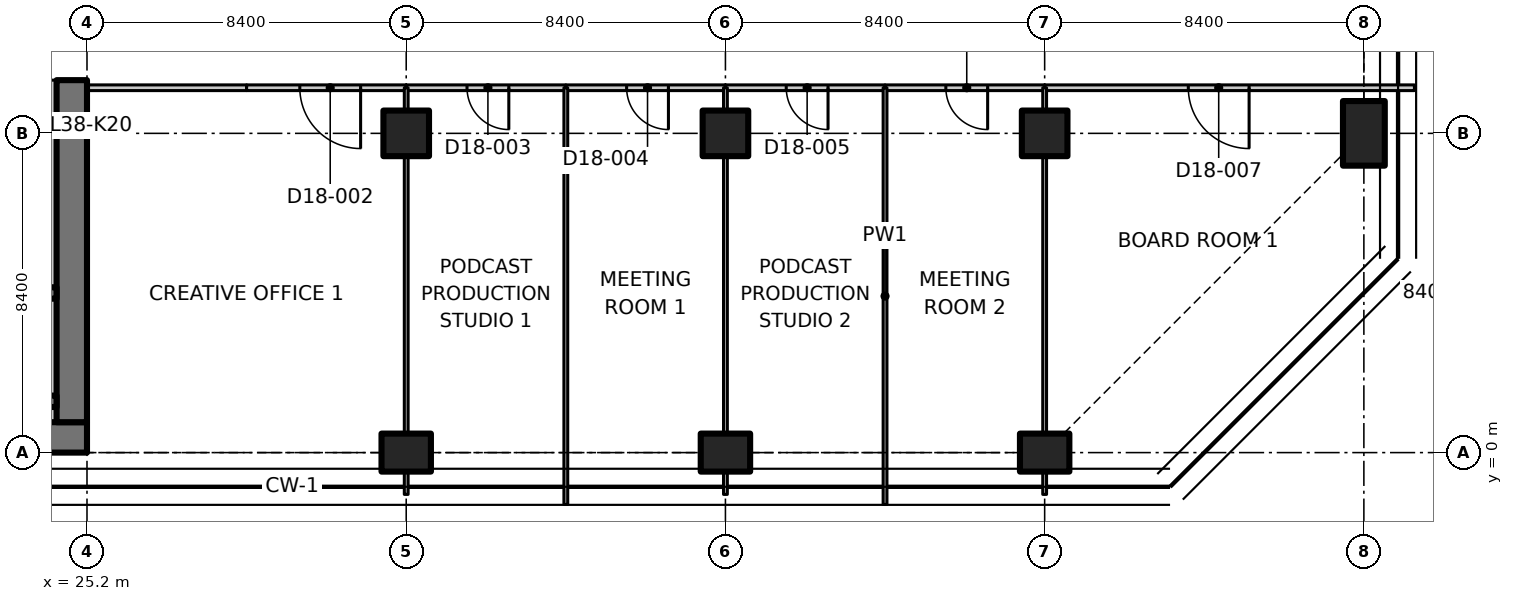
"""IFC4 building model, lengths in metres.
Left out: names, types, materials, properties, quantities, classifications, styles, units other than length and angle.
Written with IfcOpenShell. Run it as: python <this file> out.ifc"""

import sys

from ifc_helpers import new_model, si_unit, direction, frame, frame_2d, origin, origin_2d, place, context, subcontext, project, spatial, polyline, rectangle, outline, extrude, element, fill, save


model = new_model("IFC4")
c1 = context("Model", 3, precision=1e-05, world=origin(), true_north=direction((0.0, 1.0)))
c2 = subcontext(c1, "Body", "Model", "MODEL_VIEW")
j1 = project(units=[si_unit("LENGTHUNIT", "METRE"), si_unit("PLANEANGLEUNIT", "RADIAN")], contexts=[c1])
p1 = place(None, origin())
s1 = spatial("IfcSite", under=j1, at=p1, CompositionType="ELEMENT")
p2 = place(p1, origin())
s2 = spatial("IfcBuilding", under=s1, at=p2, CompositionType="ELEMENT")
p3 = place(p2, frame((0.0, 0.0, 152.9)))
s3 = spatial("IfcBuildingStorey", under=s2, at=p3, CompositionType="ELEMENT", Elevation=152.9)
p4 = place(p3, frame((33.6, 0.0, 0.0), z_axis=(0.0, 0.0, 1.0), x_axis=(0.0, 1.0, 0.0)))
e1 = element("IfcColumn", 1, at=p4, inside=s3, PredefinedType="COLUMN", context=c2, shape_type="SweptSolid", body=[
    extrude(rectangle(XDim=1.0, YDim=1.3, at=origin_2d()), origin(), (0.0, 0.0, 1.0), 3.3),
])
p5 = place(p3, frame((33.6, 8.4, 0.0), z_axis=(0.0, 0.0, 1.0), x_axis=(1.0, 0.0, 0.0)))
e2 = element("IfcColumn", 2, at=p5, inside=s3, PredefinedType="COLUMN", context=c2, shape_type="SweptSolid", body=[
    extrude(rectangle(XDim=1.2, YDim=1.2, at=origin_2d()), origin(), (0.0, 0.0, 1.0), 3.3),
])
p6 = place(p3, frame((42.0, 0.0, 0.0), z_axis=(0.0, 0.0, 1.0), x_axis=(0.0, 1.0, 0.0)))
e3 = element("IfcColumn", 3, at=p6, inside=s3, PredefinedType="COLUMN", context=c2, shape_type="SweptSolid", body=[
    extrude(rectangle(XDim=1.0, YDim=1.3, at=origin_2d()), origin(), (0.0, 0.0, 1.0), 3.3),
])
p7 = place(p3, frame((42.0, 8.4, 0.0), z_axis=(0.0, 0.0, 1.0), x_axis=(1.0, 0.0, 0.0)))
e4 = element("IfcColumn", 4, at=p7, inside=s3, PredefinedType="COLUMN", context=c2, shape_type="SweptSolid", body=[
    extrude(rectangle(XDim=1.2, YDim=1.2, at=origin_2d()), origin(), (0.0, 0.0, 1.0), 3.3),
])
p8 = place(p3, frame((50.4, 0.0, 0.0), z_axis=(0.0, 0.0, 1.0), x_axis=(0.0, 1.0, 0.0)))
e5 = element("IfcColumn", 5, at=p8, inside=s3, PredefinedType="COLUMN", context=c2, shape_type="SweptSolid", body=[
    extrude(rectangle(XDim=1.0, YDim=1.3, at=origin_2d()), origin(), (0.0, 0.0, 1.0), 3.3),
])
p9 = place(p3, frame((50.4, 8.4, 0.0), z_axis=(0.0, 0.0, 1.0), x_axis=(1.0, 0.0, 0.0)))
e6 = element("IfcColumn", 6, at=p9, inside=s3, PredefinedType="COLUMN", context=c2, shape_type="SweptSolid", body=[
    extrude(rectangle(XDim=1.2, YDim=1.2, at=origin_2d()), origin(), (0.0, 0.0, 1.0), 3.3),
])
p10 = place(p3, frame((58.8, 8.4, 0.0), z_axis=(0.0, 0.0, 1.0), x_axis=(1.0, 0.0, 0.0)))
e7 = element("IfcColumn", 7, at=p10, inside=s3, PredefinedType="COLUMN", context=c2, shape_type="SweptSolid", body=[
    extrude(rectangle(XDim=1.1, YDim=1.7, at=origin_2d()), origin(), (0.0, 0.0, 1.0), 3.3),
])
p11 = place(p3, frame((7.136, 0.4, 0.0), z_axis=(0.0, 0.0, 1.0), x_axis=(1.0, 0.0, 0.0)))
e8 = element("IfcWall", 8, at=p11, inside=s3, PredefinedType="SHEAR", context=c2, shape_type="SweptSolid", body=[
    extrude(rectangle(XDim=18.063, YDim=0.8, at=frame_2d((9.032, 0.0))), origin(), (0.0, 0.0, 1.0), 3.3),
])
p12 = place(p3, frame((24.8, 0.8, 0.0), z_axis=(0.0, 0.0, 1.0), x_axis=(0.0, 1.0, 0.0)))
e9 = element("IfcWall", 9, at=p12, inside=s3, PredefinedType="SHEAR", context=c2, shape_type="SweptSolid", body=[
    extrude(rectangle(XDim=9.0, YDim=0.8, at=frame_2d((4.5, 0.0))), origin(), (0.0, 0.0, 1.0), 3.3),
])
p13 = place(p3, frame((15.8, 1.35, 0.0), z_axis=(0.0, 0.0, 1.0), x_axis=(1.0, 0.0, 0.0)))
e10 = element("IfcWall", 10, at=p13, inside=s3, PredefinedType="SHEAR", context=c2, shape_type="SweptSolid", body=[
    extrude(rectangle(XDim=8.6, YDim=0.3, at=frame_2d((4.3, 0.0))), origin(), (0.0, 0.0, 1.0), 3.3),
])
p14 = place(p3, frame((15.8, 4.2, 0.0), z_axis=(0.0, 0.0, 1.0), x_axis=(1.0, 0.0, 0.0)))
e11 = element("IfcWall", 11, at=p14, inside=s3, PredefinedType="SHEAR", context=c2, shape_type="SweptSolid", body=[
    extrude(rectangle(XDim=8.6, YDim=0.3, at=frame_2d((4.3, 0.0))), origin(), (0.0, 0.0, 1.0), 3.3),
])
p15 = place(p14, frame((0.4, 0.0, 0.0)))
e12 = element("IfcOpeningElement", 12, at=p15, cuts=e11, PredefinedType="OPENING", context=c2, shape_type="SweptSolid", body=[
    extrude(rectangle(XDim=1.0, YDim=2.1, at=frame_2d((0.5, 1.05))), frame((0.0, 0.16, 0.0), z_axis=(0.0, -1.0, 0.0), x_axis=(1.0, 0.0, 0.0)), (0.0, 0.0, 1.0), 0.32),
])
p16 = place(p3, frame((13.35, 1.0, 0.0), z_axis=(0.0, 0.0, 1.0), x_axis=(1.0, 0.0, 0.0)))
e13 = element("IfcWall", 13, at=p16, inside=s3, PredefinedType="PARTITIONING", context=c2, shape_type="SweptSolid", body=[
    extrude(rectangle(XDim=11.05, YDim=0.4, at=frame_2d((5.525, 0.0))), origin(), (0.0, 0.0, 1.0), 3.3),
])
p17 = place(p3, frame((24.2, 1.5, 0.0), z_axis=(0.0, 0.0, 1.0), x_axis=(0.0, 1.0, 0.0)))
e14 = element("IfcWall", 14, at=p17, inside=s3, PredefinedType="PARTITIONING", context=c2, shape_type="SweptSolid", body=[
    extrude(rectangle(XDim=2.55, YDim=0.4, at=frame_2d((1.275, 0.0))), origin(), (0.0, 0.0, 1.0), 3.3),
])
p18 = place(p3, frame((24.2, 4.35, 0.0), z_axis=(0.0, 0.0, 1.0), x_axis=(0.0, 1.0, 0.0)))
e15 = element("IfcWall", 15, at=p18, inside=s3, PredefinedType="PARTITIONING", context=c2, shape_type="SweptSolid", body=[
    extrude(rectangle(XDim=5.45, YDim=0.4, at=frame_2d((2.725, 0.0))), origin(), (0.0, 0.0, 1.0), 3.3),
])
p19 = place(p3, frame((29.4, 9.6, 0.0), z_axis=(0.0, 0.0, 1.0), x_axis=(-1.0, 0.0, 0.0)))
e16 = element("IfcWall", 16, at=p19, inside=s3, PredefinedType="PARTITIONING", context=c2, shape_type="SweptSolid", body=[
    extrude(rectangle(XDim=4.2, YDim=0.15, at=frame_2d((2.1, 0.0))), origin(), (0.0, 0.0, 1.0), 3.28),
])
p20 = place(p3, frame((33.6, 9.6, 0.0), z_axis=(0.0, 0.0, 1.0), x_axis=(-1.0, 0.0, 0.0)))
e17 = element("IfcWall", 17, at=p20, inside=s3, PredefinedType="PARTITIONING", context=c2, shape_type="SweptSolid", body=[
    extrude(rectangle(XDim=4.2, YDim=0.15, at=frame_2d((2.1, 0.0))), origin(), (0.0, 0.0, 1.0), 3.28),
])
p21 = place(p20, frame((1.2, 0.0, 0.0)))
e18 = element("IfcOpeningElement", 18, at=p21, cuts=e17, PredefinedType="OPENING", context=c2, shape_type="SweptSolid", body=[
    extrude(rectangle(XDim=1.6, YDim=2.1, at=frame_2d((0.8, 1.05))), frame((0.0, 0.085, 0.0), z_axis=(0.0, -1.0, 0.0), x_axis=(1.0, 0.0, 0.0)), (0.0, 0.0, 1.0), 0.17),
])
p22 = place(p3, frame((37.8, 9.6, 0.0), z_axis=(0.0, 0.0, 1.0), x_axis=(-1.0, 0.0, 0.0)))
e19 = element("IfcWall", 19, at=p22, inside=s3, PredefinedType="PARTITIONING", context=c2, shape_type="SweptSolid", body=[
    extrude(rectangle(XDim=4.2, YDim=0.15, at=frame_2d((2.1, 0.0))), origin(), (0.0, 0.0, 1.0), 3.28),
])
p23 = place(p22, frame((1.5, 0.0, 0.0)))
e20 = element("IfcOpeningElement", 20, at=p23, cuts=e19, PredefinedType="OPENING", context=c2, shape_type="SweptSolid", body=[
    extrude(rectangle(XDim=1.1, YDim=2.1, at=frame_2d((0.55, 1.05))), frame((0.0, 0.085, 0.0), z_axis=(0.0, -1.0, 0.0), x_axis=(1.0, 0.0, 0.0)), (0.0, 0.0, 1.0), 0.17),
])
p24 = place(p3, frame((42.0, 9.6, 0.0), z_axis=(0.0, 0.0, 1.0), x_axis=(-1.0, 0.0, 0.0)))
e21 = element("IfcWall", 21, at=p24, inside=s3, PredefinedType="PARTITIONING", context=c2, shape_type="SweptSolid", body=[
    extrude(rectangle(XDim=4.2, YDim=0.15, at=frame_2d((2.1, 0.0))), origin(), (0.0, 0.0, 1.0), 3.28),
])
p25 = place(p24, frame((1.5, 0.0, 0.0)))
e22 = element("IfcOpeningElement", 22, at=p25, cuts=e21, PredefinedType="OPENING", context=c2, shape_type="SweptSolid", body=[
    extrude(rectangle(XDim=1.1, YDim=2.1, at=frame_2d((0.55, 1.05))), frame((0.0, 0.085, 0.0), z_axis=(0.0, -1.0, 0.0), x_axis=(1.0, 0.0, 0.0)), (0.0, 0.0, 1.0), 0.17),
])
p26 = place(p3, frame((46.2, 9.6, 0.0), z_axis=(0.0, 0.0, 1.0), x_axis=(-1.0, 0.0, 0.0)))
e23 = element("IfcWall", 23, at=p26, inside=s3, PredefinedType="PARTITIONING", context=c2, shape_type="SweptSolid", body=[
    extrude(rectangle(XDim=4.2, YDim=0.15, at=frame_2d((2.1, 0.0))), origin(), (0.0, 0.0, 1.0), 3.28),
])
p27 = place(p26, frame((1.5, 0.0, 0.0)))
e24 = element("IfcOpeningElement", 24, at=p27, cuts=e23, PredefinedType="OPENING", context=c2, shape_type="SweptSolid", body=[
    extrude(rectangle(XDim=1.1, YDim=2.1, at=frame_2d((0.55, 1.05))), frame((0.0, 0.085, 0.0), z_axis=(0.0, -1.0, 0.0), x_axis=(1.0, 0.0, 0.0)), (0.0, 0.0, 1.0), 0.17),
])
p28 = place(p3, frame((50.4, 9.6, 0.0), z_axis=(0.0, 0.0, 1.0), x_axis=(-1.0, 0.0, 0.0)))
e25 = element("IfcWall", 25, at=p28, inside=s3, PredefinedType="PARTITIONING", context=c2, shape_type="SweptSolid", body=[
    extrude(rectangle(XDim=4.2, YDim=0.15, at=frame_2d((2.1, 0.0))), origin(), (0.0, 0.0, 1.0), 3.28),
])
p29 = place(p28, frame((1.5, 0.0, 0.0)))
e26 = element("IfcOpeningElement", 26, at=p29, cuts=e25, PredefinedType="OPENING", context=c2, shape_type="SweptSolid", body=[
    extrude(rectangle(XDim=1.1, YDim=2.1, at=frame_2d((0.55, 1.05))), frame((0.0, 0.085, 0.0), z_axis=(0.0, -1.0, 0.0), x_axis=(1.0, 0.0, 0.0)), (0.0, 0.0, 1.0), 0.17),
])
p30 = place(p3, frame((60.131, 9.6, 0.0), z_axis=(0.0, 0.0, 1.0), x_axis=(-1.0, 0.0, 0.0)))
e27 = element("IfcWall", 27, at=p30, inside=s3, PredefinedType="PARTITIONING", context=c2, shape_type="SweptSolid", body=[
    extrude(outline(polyline([(0.0, 0.0), (9.731, 0.0), (9.73, 3.28), (1.781, 3.28), (1.779, 2.93), (0.883, 2.93), (0.881, 3.28), (0.25, 3.28), (0.0, 3.28), (0.0, 0.0)])), frame((0.0, 0.075, 0.0), z_axis=(0.0, -1.0, 0.0), x_axis=(1.0, 0.0, 0.0)), (0.0, 0.0, 1.0), 0.15),
])
p31 = place(p30, frame((4.351, 0.0, 0.0)))
e28 = element("IfcOpeningElement", 28, at=p31, cuts=e27, PredefinedType="OPENING", context=c2, shape_type="SweptSolid", body=[
    extrude(rectangle(XDim=1.6, YDim=2.1, at=frame_2d((0.8, 1.05))), frame((0.0, 0.085, 0.0), z_axis=(0.0, -1.0, 0.0), x_axis=(1.0, 0.0, 0.0)), (0.0, 0.0, 1.0), 0.17),
])
p32 = place(p3, frame((33.6, 9.6, 0.0), z_axis=(0.0, 0.0, 1.0), x_axis=(0.0, -1.0, 0.0)))
e29 = element("IfcWall", 29, at=p32, inside=s3, PredefinedType="PARTITIONING", context=c2, shape_type="SweptSolid", body=[
    extrude(rectangle(XDim=0.58, YDim=0.1, at=frame_2d((0.29, 0.0))), origin(), (0.0, 0.0, 1.0), 3.28),
])
p33 = place(p3, frame((33.6, 7.78, 0.0), z_axis=(0.0, 0.0, 1.0), x_axis=(0.0, -1.0, 0.0)))
e30 = element("IfcWall", 30, at=p33, inside=s3, PredefinedType="PARTITIONING", context=c2, shape_type="SweptSolid", body=[
    extrude(rectangle(XDim=7.26, YDim=0.1, at=frame_2d((3.63, 0.0))), origin(), (0.0, 0.0, 1.0), 3.28),
])
p34 = place(p3, frame((33.6, -0.52, 0.0), z_axis=(0.0, 0.0, 1.0), x_axis=(0.0, -1.0, 0.0)))
e31 = element("IfcWall", 31, at=p34, inside=s3, PredefinedType="PARTITIONING", context=c2, shape_type="SweptSolid", body=[
    extrude(rectangle(XDim=0.58, YDim=0.1, at=frame_2d((0.29, 0.0))), origin(), (0.0, 0.0, 1.0), 3.28),
])
p35 = place(p3, frame((37.8, 9.6, 0.0), z_axis=(0.0, 0.0, 1.0), x_axis=(0.0, -1.0, 0.0)))
e32 = element("IfcWall", 32, at=p35, inside=s3, PredefinedType="PARTITIONING", context=c2, shape_type="SweptSolid", body=[
    extrude(outline(polyline([(0.0, 0.0), (10.965, 0.0), (10.965, 3.28), (10.7, 3.28), (10.05, 3.28), (10.048, 2.93), (9.152, 2.93), (9.15, 3.28), (0.0, 3.28), (0.0, 0.0)])), frame((0.0, 0.05, 0.0), z_axis=(0.0, -1.0, 0.0), x_axis=(1.0, 0.0, 0.0)), (0.0, 0.0, 1.0), 0.1),
])
p36 = place(p3, frame((42.0, 9.6, 0.0), z_axis=(0.0, 0.0, 1.0), x_axis=(0.0, -1.0, 0.0)))
e33 = element("IfcWall", 33, at=p36, inside=s3, PredefinedType="PARTITIONING", context=c2, shape_type="SweptSolid", body=[
    extrude(rectangle(XDim=0.58, YDim=0.1, at=frame_2d((0.29, 0.0))), origin(), (0.0, 0.0, 1.0), 3.28),
])
p37 = place(p3, frame((42.0, 7.78, 0.0), z_axis=(0.0, 0.0, 1.0), x_axis=(0.0, -1.0, 0.0)))
e34 = element("IfcWall", 34, at=p37, inside=s3, PredefinedType="PARTITIONING", context=c2, shape_type="SweptSolid", body=[
    extrude(rectangle(XDim=7.26, YDim=0.1, at=frame_2d((3.63, 0.0))), origin(), (0.0, 0.0, 1.0), 3.28),
])
p38 = place(p3, frame((42.0, -0.52, 0.0), z_axis=(0.0, 0.0, 1.0), x_axis=(0.0, -1.0, 0.0)))
e35 = element("IfcWall", 35, at=p38, inside=s3, PredefinedType="PARTITIONING", context=c2, shape_type="SweptSolid", body=[
    extrude(rectangle(XDim=0.58, YDim=0.1, at=frame_2d((0.29, 0.0))), origin(), (0.0, 0.0, 1.0), 3.28),
])
p39 = place(p3, frame((46.2, 9.6, 0.0), z_axis=(0.0, 0.0, 1.0), x_axis=(0.0, -1.0, 0.0)))
e36 = element("IfcWall", 36, at=p39, inside=s3, PredefinedType="PARTITIONING", context=c2, shape_type="SweptSolid", body=[
    extrude(outline(polyline([(0.0, 0.0), (10.965, 0.0), (10.965, 3.28), (10.7, 3.28), (10.05, 3.28), (10.048, 2.93), (9.152, 2.93), (9.15, 3.28), (0.0, 3.28), (0.0, 0.0)])), frame((0.0, 0.05, 0.0), z_axis=(0.0, -1.0, 0.0), x_axis=(1.0, 0.0, 0.0)), (0.0, 0.0, 1.0), 0.1),
])
p40 = place(p3, frame((50.4, 9.6, 0.0), z_axis=(0.0, 0.0, 1.0), x_axis=(0.0, -1.0, 0.0)))
e37 = element("IfcWall", 37, at=p40, inside=s3, PredefinedType="PARTITIONING", context=c2, shape_type="SweptSolid", body=[
    extrude(rectangle(XDim=0.58, YDim=0.1, at=frame_2d((0.29, 0.0))), origin(), (0.0, 0.0, 1.0), 3.28),
])
p41 = place(p3, frame((50.4, 7.78, 0.0), z_axis=(0.0, 0.0, 1.0), x_axis=(0.0, -1.0, 0.0)))
e38 = element("IfcWall", 38, at=p41, inside=s3, PredefinedType="PARTITIONING", context=c2, shape_type="SweptSolid", body=[
    extrude(outline(polyline([(0.0, 0.0), (7.26, 0.0), (7.26, 2.93), (7.116, 2.93), (7.114, 3.28), (0.0, 3.28), (0.0, 0.0)])), frame((0.0, 0.05, 0.0), z_axis=(0.0, -1.0, 0.0), x_axis=(1.0, 0.0, 0.0)), (0.0, 0.0, 1.0), 0.1),
])
p42 = place(p3, frame((50.4, -0.52, 0.0), z_axis=(0.0, 0.0, 1.0), x_axis=(0.0, -1.0, 0.0)))
e39 = element("IfcWall", 39, at=p42, inside=s3, PredefinedType="PARTITIONING", context=c2, shape_type="SweptSolid", body=[
    extrude(rectangle(XDim=0.58, YDim=0.1, at=frame_2d((0.29, 0.0))), origin(), (0.0, 0.0, 1.0), 3.28),
])
p43 = place(p21, origin())
e40 = element("IfcDoor", 40, at=p43, inside=s3, OperationType="DOUBLE_DOOR_SINGLE_SWING", PredefinedType="DOOR", context=c2, shape_type="SweptSolid", body=[
    extrude(rectangle(XDim=1.6, YDim=2.1, at=frame_2d((0.8, 1.05))), frame((0.0, 0.025, 0.0), z_axis=(0.0, -1.0, 0.0), x_axis=(1.0, 0.0, 0.0)), (0.0, 0.0, 1.0), 0.05),
])
fill(e18, e40)
p44 = place(p23, origin())
e41 = element("IfcDoor", 41, at=p44, inside=s3, OperationType="SINGLE_SWING_LEFT", PredefinedType="DOOR", context=c2, shape_type="SweptSolid", body=[
    extrude(rectangle(XDim=1.1, YDim=2.1, at=frame_2d((0.55, 1.05))), frame((0.0, 0.025, 0.0), z_axis=(0.0, -1.0, 0.0), x_axis=(1.0, 0.0, 0.0)), (0.0, 0.0, 1.0), 0.05),
])
fill(e20, e41)
p45 = place(p25, origin())
e42 = element("IfcDoor", 42, at=p45, inside=s3, OperationType="SINGLE_SWING_LEFT", PredefinedType="DOOR", context=c2, shape_type="SweptSolid", body=[
    extrude(rectangle(XDim=1.1, YDim=2.1, at=frame_2d((0.55, 1.05))), frame((0.0, 0.025, 0.0), z_axis=(0.0, -1.0, 0.0), x_axis=(1.0, 0.0, 0.0)), (0.0, 0.0, 1.0), 0.05),
])
fill(e22, e42)
p46 = place(p27, origin())
e43 = element("IfcDoor", 43, at=p46, inside=s3, OperationType="SINGLE_SWING_LEFT", PredefinedType="DOOR", context=c2, shape_type="SweptSolid", body=[
    extrude(rectangle(XDim=1.1, YDim=2.1, at=frame_2d((0.55, 1.05))), frame((0.0, 0.025, 0.0), z_axis=(0.0, -1.0, 0.0), x_axis=(1.0, 0.0, 0.0)), (0.0, 0.0, 1.0), 0.05),
])
fill(e24, e43)
p47 = place(p29, origin())
e44 = element("IfcDoor", 44, at=p47, inside=s3, OperationType="SINGLE_SWING_LEFT", PredefinedType="DOOR", context=c2, shape_type="SweptSolid", body=[
    extrude(rectangle(XDim=1.1, YDim=2.1, at=frame_2d((0.55, 1.05))), frame((0.0, 0.025, 0.0), z_axis=(0.0, -1.0, 0.0), x_axis=(1.0, 0.0, 0.0)), (0.0, 0.0, 1.0), 0.05),
])
fill(e26, e44)
p48 = place(p31, origin())
e45 = element("IfcDoor", 45, at=p48, inside=s3, OperationType="DOUBLE_DOOR_SINGLE_SWING", PredefinedType="DOOR", context=c2, shape_type="SweptSolid", body=[
    extrude(rectangle(XDim=1.6, YDim=2.1, at=frame_2d((0.8, 1.05))), frame((0.0, 0.025, 0.0), z_axis=(0.0, -1.0, 0.0), x_axis=(1.0, 0.0, 0.0)), (0.0, 0.0, 1.0), 0.05),
])
fill(e28, e45)
save(model, sys.argv[1])
